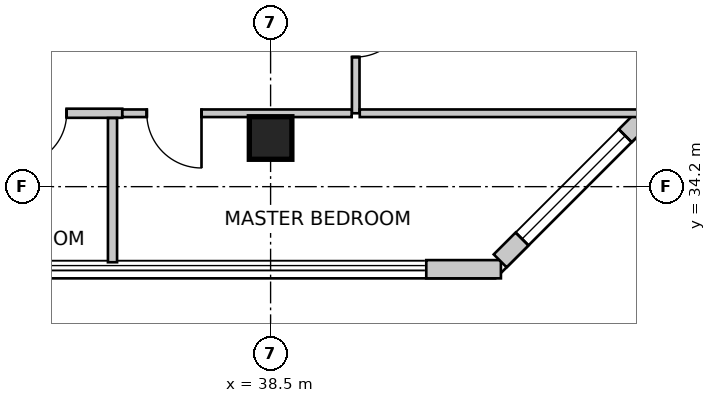
"""IFC4 building model, lengths in metres.
Left out: names, types, materials, properties, quantities, classifications, styles, units other than length and angle.
Written with IfcOpenShell. Run it as: python <this file> out.ifc"""

import sys

from ifc_helpers import new_model, si_unit, direction, frame, frame_2d, origin, origin_2d, place, context, subcontext, project, spatial, rectangle, extrude, source, transform, mapped, element, fill, save


model = new_model("IFC4")
c1 = context("Model", 3, precision=1e-05, world=origin(), true_north=direction((0.0, 1.0)))
c2 = subcontext(c1, "Body", "Model", "MODEL_VIEW")
j1 = project(units=[si_unit("LENGTHUNIT", "METRE"), si_unit("PLANEANGLEUNIT", "RADIAN")], contexts=[c1])
p1 = place(None, origin())
s1 = spatial("IfcSite", under=j1, at=p1, CompositionType="ELEMENT")
p2 = place(p1, origin())
s2 = spatial("IfcBuilding", under=s1, at=p2, CompositionType="ELEMENT")
p3 = place(p2, frame((0.0, 0.0, 218.4)))
s3 = spatial("IfcBuildingStorey", under=s2, at=p3, CompositionType="ELEMENT", Elevation=218.4)
m1 = source(origin(), c2, "Body", "SweptSolid", [
    extrude(rectangle(XDim=0.7, YDim=0.7, at=origin_2d()), origin(), (0.0, 0.0, 1.0), 3.5),
])
p4 = place(p3, frame((38.5, 35.0, 0.0), z_axis=(0.0, 0.0, 1.0), x_axis=(1.0, 0.0, 0.0)))
e1 = element("IfcColumn", 1, at=p4, inside=s3, PredefinedType="COLUMN", context=c2, shape_type="MappedRepresentation", body=[
    mapped(m1, transform((0.0, 0.0, 0.0), scale=1.0)),
])
p5 = place(p3, frame((41.06, 32.842, 0.0), z_axis=(0.0, 0.0, 1.0), x_axis=(1.0, 0.0, 0.0)))
e2 = element("IfcWall", 2, at=p5, inside=s3, PredefinedType="SOLIDWALL", context=c2, shape_type="SweptSolid", body=[
    extrude(rectangle(XDim=1.228, YDim=0.3, at=frame_2d((0.614, 0.0))), origin(), (0.0, 0.0, 1.0), 3.25),
])
p6 = place(p3, frame((42.276, 32.98, 0.0), z_axis=(0.0, 0.0, 1.0), x_axis=(0.707106781187, 0.707106781187, 0.0)))
e3 = element("IfcWall", 3, at=p6, inside=s3, PredefinedType="SOLIDWALL", context=c2, shape_type="SweptSolid", body=[
    extrude(rectangle(XDim=4.922, YDim=0.3, at=frame_2d((2.461, 0.0))), origin(), (0.0, 0.0, 1.0), 3.25),
])
m2 = source(origin(), c2, "Body", "SweptSolid", [
    extrude(rectangle(XDim=2.4, YDim=2.2, at=frame_2d((1.2, 1.1))), frame((0.0, 0.16, 0.0), z_axis=(0.0, -1.0, 0.0), x_axis=(1.0, 0.0, 0.0)), (0.0, 0.0, 1.0), 0.32),
])
p7 = place(p6, frame((0.509, 0.0, 0.85)))
e4 = element("IfcOpeningElement", 4, at=p7, cuts=e3, PredefinedType="OPENING", context=c2, shape_type="MappedRepresentation", body=[
    mapped(m2, transform((0.0, 0.0, 0.0), scale=1.0)),
])
p8 = place(p3, frame((39.9, 38.106, 0.0), z_axis=(0.0, 0.0, 1.0), x_axis=(0.0, -1.0, 0.0)))
e5 = element("IfcWall", 5, at=p8, inside=s3, PredefinedType="PARTITIONING", context=c2, shape_type="SweptSolid", body=[
    extrude(rectangle(XDim=2.699, YDim=0.125, at=frame_2d((1.35, 0.0))), origin(), (0.0, 0.0, 1.0), 3.25),
])
m3 = source(origin(), c2, "Body", "SweptSolid", [
    extrude(rectangle(XDim=0.85, YDim=2.15, at=frame_2d((0.425, 1.075))), frame((0.0, 0.073, 0.0), z_axis=(0.0, -1.0, 0.0), x_axis=(1.0, 0.0, 0.0)), (0.0, 0.0, 1.0), 0.145),
])
p9 = place(p8, frame((0.925, 0.0, 0.0)))
e6 = element("IfcOpeningElement", 6, at=p9, cuts=e5, PredefinedType="OPENING", context=c2, shape_type="MappedRepresentation", body=[
    mapped(m3, transform((0.0, 0.0, 0.0), scale=1.0)),
])
p10 = place(p3, frame((36.06, 35.407, 0.0), z_axis=(0.0, 0.0, 1.0), x_axis=(-1.0, 0.0, 0.0)))
e7 = element("IfcWall", 7, at=p10, inside=s3, PredefinedType="PARTITIONING", context=c2, shape_type="SweptSolid", body=[
    extrude(rectangle(XDim=2.806, YDim=0.15, at=frame_2d((1.403, 0.0))), origin(), (0.0, 0.0, 1.0), 3.25),
])
m4 = source(origin(), c2, "Body", "SweptSolid", [
    extrude(rectangle(XDim=0.85, YDim=2.15, at=frame_2d((0.425, 1.075))), frame((0.0, 0.085, 0.0), z_axis=(0.0, -1.0, 0.0), x_axis=(1.0, 0.0, 0.0)), (0.0, 0.0, 1.0), 0.17),
])
p11 = place(p10, frame((0.915, 0.0, 0.0)))
e8 = element("IfcOpeningElement", 8, at=p11, cuts=e7, PredefinedType="OPENING", context=c2, shape_type="MappedRepresentation", body=[
    mapped(m4, transform((0.0, 0.0, 0.0), scale=1.0)),
])
p12 = place(p3, frame((39.833, 35.407, 0.0), z_axis=(0.0, 0.0, 1.0), x_axis=(-1.0, 0.0, 0.0)))
e9 = element("IfcWall", 9, at=p12, inside=s3, PredefinedType="PARTITIONING", context=c2, shape_type="SweptSolid", body=[
    extrude(rectangle(XDim=3.771, YDim=0.125, at=frame_2d((1.886, 0.0))), origin(), (0.0, 0.0, 1.0), 2.766),
])
m5 = source(origin(), c2, "Body", "SweptSolid", [
    extrude(rectangle(XDim=0.9, YDim=2.15, at=frame_2d((0.45, 1.075))), frame((0.0, 0.073, 0.0), z_axis=(0.0, -1.0, 0.0), x_axis=(1.0, 0.0, 0.0)), (0.0, 0.0, 1.0), 0.145),
])
p13 = place(p12, frame((2.47, 0.0, 0.0)))
e10 = element("IfcOpeningElement", 10, at=p13, cuts=e9, PredefinedType="OPENING", context=c2, shape_type="MappedRepresentation", body=[
    mapped(m5, transform((0.0, 0.0, 0.0), scale=1.0)),
])
p14 = place(p3, frame((44.54, 35.407, 0.0), z_axis=(0.0, 0.0, 1.0), x_axis=(-1.0, 0.0, 0.0)))
e11 = element("IfcWall", 11, at=p14, inside=s3, PredefinedType="PARTITIONING", context=c2, shape_type="SweptSolid", body=[
    extrude(rectangle(XDim=4.574, YDim=0.125, at=frame_2d((2.287, 0.0))), origin(), (0.0, 0.0, 1.0), 3.25),
])
p15 = place(p3, frame((35.9, 35.328, 0.0), z_axis=(0.0, 0.0, 1.0), x_axis=(0.0, -1.0, 0.0)))
e12 = element("IfcWall", 12, at=p15, inside=s3, PredefinedType="PARTITIONING", context=c2, shape_type="SweptSolid", body=[
    extrude(rectangle(XDim=2.371, YDim=0.15, at=frame_2d((1.186, 0.0))), origin(), (0.0, 0.0, 1.0), 3.25),
])
m6 = source(origin(), c2, "Body", "SweptSolid", [
    extrude(rectangle(XDim=2.4, YDim=2.2, at=frame_2d((1.2, 1.1))), frame((0.0, -0.015, 0.0), z_axis=(0.0, -1.0, 0.0), x_axis=(1.0, 0.0, 0.0)), (0.0, 0.0, 1.0), 0.06),
])
p16 = place(p7, origin())
e13 = element("IfcWindow", 13, at=p16, inside=s3, PartitioningType="SINGLE_PANEL", PredefinedType="WINDOW", context=c2, shape_type="MappedRepresentation", body=[
    mapped(m6, transform((0.0, 0.0, 0.0), scale=1.0)),
])
fill(e4, e13)
m7 = source(origin(), c2, "Body", "SweptSolid", [
    extrude(rectangle(XDim=0.85, YDim=2.15, at=frame_2d((0.425, 1.075))), frame((0.0, 0.025, 0.0), z_axis=(0.0, -1.0, 0.0), x_axis=(1.0, 0.0, 0.0)), (0.0, 0.0, 1.0), 0.05),
])
p17 = place(p9, origin())
e14 = element("IfcDoor", 14, at=p17, inside=s3, OperationType="SINGLE_SWING_LEFT", PredefinedType="DOOR", context=c2, shape_type="MappedRepresentation", body=[
    mapped(m7, transform((0.0, 0.0, 0.0), scale=1.0)),
])
fill(e6, e14)
p18 = place(p11, origin())
e15 = element("IfcDoor", 15, at=p18, inside=s3, OperationType="SINGLE_SWING_RIGHT", PredefinedType="DOOR", context=c2, shape_type="MappedRepresentation", body=[
    mapped(m7, transform((0.0, 0.0, 0.0), scale=1.0)),
])
fill(e8, e15)
m8 = source(origin(), c2, "Body", "SweptSolid", [
    extrude(rectangle(XDim=0.9, YDim=2.15, at=frame_2d((0.45, 1.075))), frame((0.0, 0.025, 0.0), z_axis=(0.0, -1.0, 0.0), x_axis=(1.0, 0.0, 0.0)), (0.0, 0.0, 1.0), 0.05),
])
p19 = place(p13, origin())
e16 = element("IfcDoor", 16, at=p19, inside=s3, OperationType="SINGLE_SWING_LEFT", PredefinedType="DOOR", context=c2, shape_type="MappedRepresentation", body=[
    mapped(m8, transform((0.0, 0.0, 0.0), scale=1.0)),
])
fill(e10, e16)
save(model, sys.argv[1])
